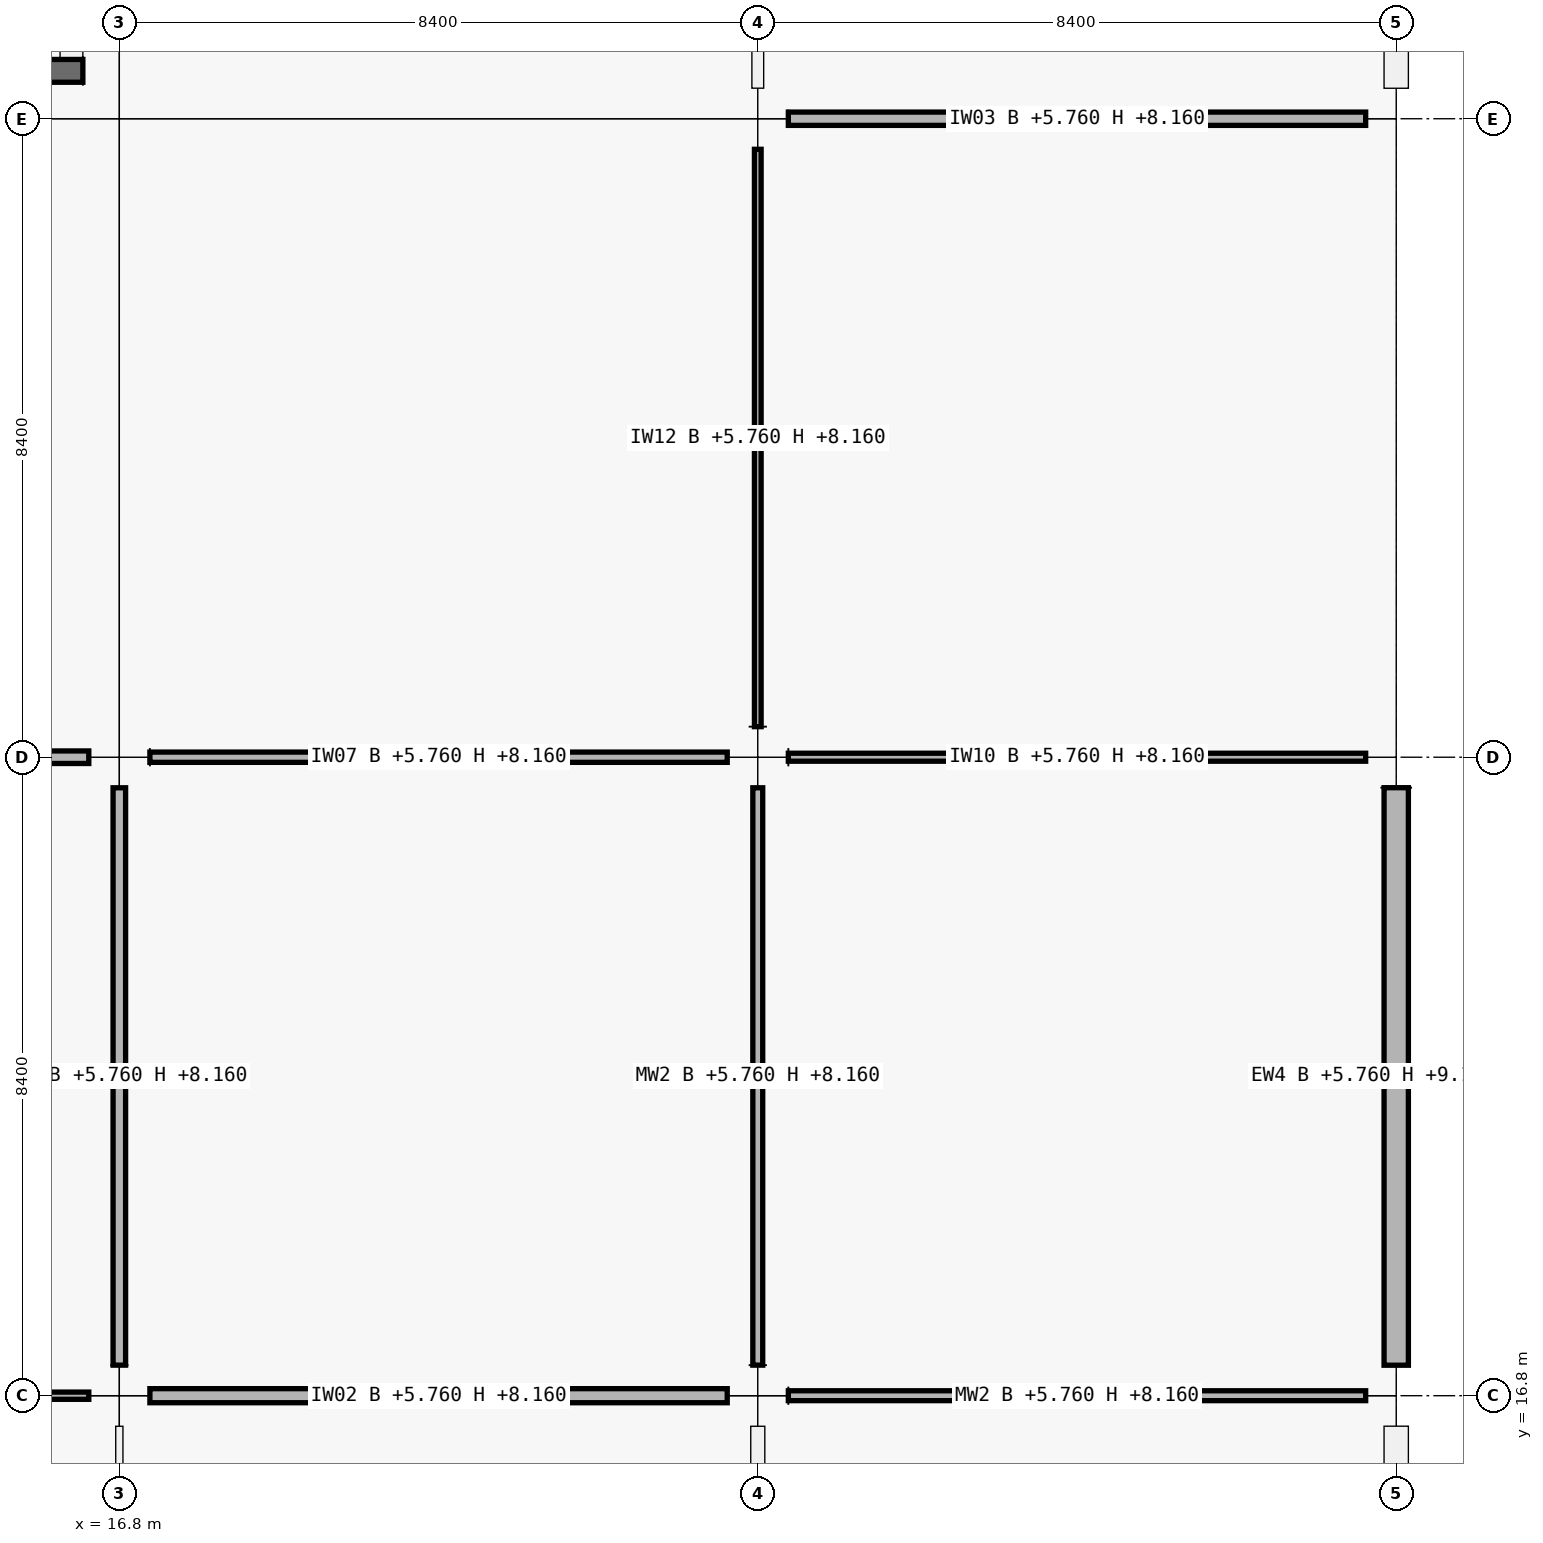
"""IFC4 building model, lengths in metres.
Left out: names, types, materials, properties, quantities, classifications, styles, units other than length and angle.
Written with IfcOpenShell. Run it as: python <this file> out.ifc"""

import sys

from ifc_helpers import new_model, si_unit, direction, frame, frame_2d, origin, origin_2d, place, context, subcontext, project, spatial, rectangle, extrude, element, fill, save


model = new_model("IFC4")
c1 = context("Model", 3, precision=1e-05, world=origin(), true_north=direction((0.0, 1.0)))
c2 = subcontext(c1, "Body", "Model", "MODEL_VIEW")
j1 = project(units=[si_unit("LENGTHUNIT", "METRE"), si_unit("PLANEANGLEUNIT", "RADIAN")], contexts=[c1])
p1 = place(None, origin())
s1 = spatial("IfcSite", under=j1, at=p1, CompositionType="ELEMENT")
p2 = place(p1, origin())
s2 = spatial("IfcBuilding", under=s1, at=p2, CompositionType="ELEMENT")
p3 = place(p2, frame((0.0, 0.0, 5.76)))
s3 = spatial("IfcBuildingStorey", under=s2, at=p3, CompositionType="ELEMENT", Elevation=5.76)
for number, where, z_axis, x_axis in (
    (1, (16.8, 16.8, 0.0), (0.0, 0.0, 1.0), (1.0, 0.0, 0.0)),
    (2, (16.8, 25.2, 0.0), (0.0, 0.0, 1.0), (1.0, 0.0, 0.0)),
    (3, (16.8, 33.6, 0.0), (0.0, 0.0, 1.0), (1.0, 0.0, 0.0)),
    (4, (25.2, 16.8, 0.0), (0.0, 0.0, 1.0), (1.0, 0.0, 0.0)),
    (5, (25.2, 25.2, 0.0), (0.0, 0.0, 1.0), (1.0, 0.0, 0.0)),
    (6, (25.2, 33.6, 0.0), (0.0, 0.0, 1.0), (1.0, 0.0, 0.0)),
    (7, (33.6, 16.8, 0.0), (0.0, 0.0, 1.0), (1.0, 0.0, 0.0)),
    (8, (33.6, 25.2, 0.0), (0.0, 0.0, 1.0), (1.0, 0.0, 0.0)),
    (9, (33.6, 33.6, 0.0), (0.0, 0.0, 1.0), (1.0, 0.0, 0.0)),
):
    element("IfcColumn", number, at=place(p3, frame(where, z_axis=z_axis, x_axis=x_axis)), inside=s3, PredefinedType="COLUMN", context=c2, shape_type="SweptSolid", body=[
        extrude(rectangle(XDim=0.8, YDim=0.8, at=origin_2d()), origin(), (0.0, 0.0, 1.0), 4.5),
    ])
p4 = place(p3, frame((33.6, 16.399, 0.0), z_axis=(0.0, 0.0, 1.0), x_axis=(0.0, -1.0, 0.0)))
e10 = element("IfcWall", 10, at=p4, inside=s3, PredefinedType="SOLIDWALL", context=c2, shape_type="SweptSolid", body=[
    extrude(rectangle(XDim=7.698, YDim=0.32, at=frame_2d((3.849, 0.0))), origin(), (0.0, 0.0, 1.0), 3.4),
])
p5 = place(p4, frame((2.699, 0.0, 0.9)))
e11 = element("IfcOpeningElement", 11, at=p5, cuts=e10, PredefinedType="OPENING", context=c2, shape_type="SweptSolid", body=[
    extrude(rectangle(XDim=2.3, YDim=1.85, at=frame_2d((1.15, 0.925))), frame((0.0, 0.16, 0.0), z_axis=(0.0, -1.0, 0.0), x_axis=(1.0, 0.0, 0.0)), (0.0, 0.0, 1.0), 0.32),
])
p6 = place(p3, frame((33.6, 24.799, 0.0), z_axis=(0.0, 0.0, 1.0), x_axis=(0.0, -1.0, 0.0)))
e12 = element("IfcWall", 12, at=p6, inside=s3, PredefinedType="SOLIDWALL", context=c2, shape_type="SweptSolid", body=[
    extrude(rectangle(XDim=7.598, YDim=0.32, at=frame_2d((3.799, 0.0))), origin(), (0.0, 0.0, 1.0), 3.4),
])
p7 = place(p6, frame((2.349, 0.0, 0.9)))
e13 = element("IfcOpeningElement", 13, at=p7, cuts=e12, PredefinedType="OPENING", context=c2, shape_type="SweptSolid", body=[
    extrude(rectangle(XDim=2.9, YDim=1.85, at=frame_2d((1.45, 0.925))), frame((0.0, 0.16, 0.0), z_axis=(0.0, -1.0, 0.0), x_axis=(1.0, 0.0, 0.0)), (0.0, 0.0, 1.0), 0.32),
])
p8 = place(p3, frame((33.6, 41.599, 0.0), z_axis=(0.0, 0.0, 1.0), x_axis=(0.0, -1.0, 0.0)))
e14 = element("IfcWall", 14, at=p8, inside=s3, PredefinedType="SOLIDWALL", context=c2, shape_type="SweptSolid", body=[
    extrude(rectangle(XDim=7.598, YDim=0.32, at=frame_2d((3.799, 0.0))), origin(), (0.0, 0.0, 1.0), 3.4),
])
p9 = place(p8, frame((3.074, 0.0, 0.9)))
e15 = element("IfcOpeningElement", 15, at=p9, cuts=e14, PredefinedType="OPENING", context=c2, shape_type="SweptSolid", body=[
    extrude(rectangle(XDim=1.45, YDim=1.85, at=frame_2d((0.725, 0.925))), frame((0.0, 0.16, 0.0), z_axis=(0.0, -1.0, 0.0), x_axis=(1.0, 0.0, 0.0)), (0.0, 0.0, 1.0), 0.32),
])
p10 = place(p3, frame((16.32, 34.23, 0.0), z_axis=(0.0, 0.0, 1.0), x_axis=(-1.0, 0.0, 0.0)))
e16 = element("IfcWall", 16, at=p10, inside=s3, PredefinedType="SHEAR", context=c2, shape_type="SweptSolid", body=[
    extrude(rectangle(XDim=7.44, YDim=0.3, at=frame_2d((3.72, 0.0))), origin(), (0.0, 0.0, 1.0), 4.5),
])
p11 = place(p10, frame((1.28, 0.0, 0.0)))
e17 = element("IfcOpeningElement", 17, at=p11, cuts=e16, PredefinedType="OPENING", context=c2, shape_type="SweptSolid", body=[
    extrude(rectangle(XDim=1.5, YDim=2.15, at=frame_2d((0.75, 1.075))), frame((0.0, 0.15, 0.0), z_axis=(0.0, -1.0, 0.0), x_axis=(1.0, 0.0, 0.0)), (0.0, 0.0, 1.0), 0.3),
])
p12 = place(p3, frame((16.17, 41.22, 0.0), z_axis=(0.0, 0.0, 1.0), x_axis=(0.0, -1.0, 0.0)))
e18 = element("IfcWall", 18, at=p12, inside=s3, PredefinedType="SHEAR", context=c2, shape_type="SweptSolid", body=[
    extrude(rectangle(XDim=6.84, YDim=0.3, at=frame_2d((3.42, 0.0))), origin(), (0.0, 0.0, 1.0), 4.5),
])
p13 = place(p3, frame((8.802, 16.8, 0.0), z_axis=(0.0, 0.0, 1.0), x_axis=(1.0, 0.0, 0.0)))
e19 = element("IfcWall", 19, at=p13, inside=s3, PredefinedType="PARTITIONING", context=c2, shape_type="SweptSolid", body=[
    extrude(rectangle(XDim=7.596, YDim=0.095, at=frame_2d((3.798, 0.0))), origin(), (0.0, 0.0, 1.0), 2.4),
])
p14 = place(p13, frame((3.258, 0.0, 0.0)))
e20 = element("IfcOpeningElement", 20, at=p14, cuts=e19, PredefinedType="OPENING", context=c2, shape_type="SweptSolid", body=[
    extrude(rectangle(XDim=1.08, YDim=2.22, at=frame_2d((0.54, 1.11))), frame((0.0, 0.047, 0.0), z_axis=(0.0, -1.0, 0.0), x_axis=(1.0, 0.0, 0.0)), (0.0, 0.0, 1.0), 0.095),
])
p15 = place(p3, frame((8.802, 25.2, 0.0), z_axis=(0.0, 0.0, 1.0), x_axis=(1.0, 0.0, 0.0)))
e21 = element("IfcWall", 21, at=p15, inside=s3, PredefinedType="PARTITIONING", context=c2, shape_type="SweptSolid", body=[
    extrude(rectangle(XDim=7.596, YDim=0.165, at=frame_2d((3.798, 0.0))), origin(), (0.0, 0.0, 1.0), 2.4),
])
p16 = place(p15, frame((3.318, 0.0, 0.0)))
e22 = element("IfcOpeningElement", 22, at=p16, cuts=e21, PredefinedType="OPENING", context=c2, shape_type="SweptSolid", body=[
    extrude(rectangle(XDim=0.96, YDim=2.18, at=frame_2d((0.48, 1.09))), frame((0.0, 0.083, 0.0), z_axis=(0.0, -1.0, 0.0), x_axis=(1.0, 0.0, 0.0)), (0.0, 0.0, 1.0), 0.165),
])
p17 = place(p3, frame((17.202, 16.8, 0.0), z_axis=(0.0, 0.0, 1.0), x_axis=(1.0, 0.0, 0.0)))
e23 = element("IfcWall", 23, at=p17, inside=s3, PredefinedType="PARTITIONING", context=c2, shape_type="SweptSolid", body=[
    extrude(rectangle(XDim=7.596, YDim=0.185, at=frame_2d((3.798, 0.0))), origin(), (0.0, 0.0, 1.0), 2.4),
])
p18 = place(p17, frame((3.268, 0.0, 0.0)))
e24 = element("IfcOpeningElement", 24, at=p18, cuts=e23, PredefinedType="OPENING", context=c2, shape_type="SweptSolid", body=[
    extrude(rectangle(XDim=1.06, YDim=2.22, at=frame_2d((0.53, 1.11))), frame((0.0, 0.093, 0.0), z_axis=(0.0, -1.0, 0.0), x_axis=(1.0, 0.0, 0.0)), (0.0, 0.0, 1.0), 0.185),
])
p19 = place(p3, frame((17.202, 25.2, 0.0), z_axis=(0.0, 0.0, 1.0), x_axis=(1.0, 0.0, 0.0)))
e25 = element("IfcWall", 25, at=p19, inside=s3, PredefinedType="PARTITIONING", context=c2, shape_type="SweptSolid", body=[
    extrude(rectangle(XDim=7.596, YDim=0.135, at=frame_2d((3.798, 0.0))), origin(), (0.0, 0.0, 1.0), 2.4),
])
p20 = place(p19, frame((3.338, 0.0, 0.0)))
e26 = element("IfcOpeningElement", 26, at=p20, cuts=e25, PredefinedType="OPENING", context=c2, shape_type="SweptSolid", body=[
    extrude(rectangle(XDim=0.92, YDim=2.15, at=frame_2d((0.46, 1.075))), frame((0.0, 0.067, 0.0), z_axis=(0.0, -1.0, 0.0), x_axis=(1.0, 0.0, 0.0)), (0.0, 0.0, 1.0), 0.135),
])
p21 = place(p3, frame((25.602, 16.8, 0.0), z_axis=(0.0, 0.0, 1.0), x_axis=(1.0, 0.0, 0.0)))
e27 = element("IfcWall", 27, at=p21, inside=s3, PredefinedType="MOVABLE", context=c2, shape_type="SweptSolid", body=[
    extrude(rectangle(XDim=7.596, YDim=0.13, at=frame_2d((3.798, 0.0))), origin(), (0.0, 0.0, 1.0), 2.4),
])
p22 = place(p21, frame((3.313, 0.0, 0.0)))
e28 = element("IfcOpeningElement", 28, at=p22, cuts=e27, PredefinedType="OPENING", context=c2, shape_type="SweptSolid", body=[
    extrude(rectangle(XDim=0.97, YDim=2.12, at=frame_2d((0.485, 1.06))), frame((0.0, 0.065, 0.0), z_axis=(0.0, -1.0, 0.0), x_axis=(1.0, 0.0, 0.0)), (0.0, 0.0, 1.0), 0.13),
])
p23 = place(p3, frame((25.602, 25.2, 0.0), z_axis=(0.0, 0.0, 1.0), x_axis=(1.0, 0.0, 0.0)))
e29 = element("IfcWall", 29, at=p23, inside=s3, PredefinedType="PARTITIONING", context=c2, shape_type="SweptSolid", body=[
    extrude(rectangle(XDim=7.596, YDim=0.105, at=frame_2d((3.798, 0.0))), origin(), (0.0, 0.0, 1.0), 2.4),
])
p24 = place(p23, frame((3.278, 0.0, 0.0)))
e30 = element("IfcOpeningElement", 30, at=p24, cuts=e29, PredefinedType="OPENING", context=c2, shape_type="SweptSolid", body=[
    extrude(rectangle(XDim=1.04, YDim=2.2, at=frame_2d((0.52, 1.1))), frame((0.0, 0.052, 0.0), z_axis=(0.0, -1.0, 0.0), x_axis=(1.0, 0.0, 0.0)), (0.0, 0.0, 1.0), 0.105),
])
p25 = place(p3, frame((25.602, 33.6, 0.0), z_axis=(0.0, 0.0, 1.0), x_axis=(1.0, 0.0, 0.0)))
e31 = element("IfcWall", 31, at=p25, inside=s3, PredefinedType="PARTITIONING", context=c2, shape_type="SweptSolid", body=[
    extrude(rectangle(XDim=7.596, YDim=0.175, at=frame_2d((3.798, 0.0))), origin(), (0.0, 0.0, 1.0), 2.4),
])
p26 = place(p25, frame((3.333, 0.0, 0.0)))
e32 = element("IfcOpeningElement", 32, at=p26, cuts=e31, PredefinedType="OPENING", context=c2, shape_type="SweptSolid", body=[
    extrude(rectangle(XDim=0.93, YDim=2.12, at=frame_2d((0.465, 1.06))), frame((0.0, 0.087, 0.0), z_axis=(0.0, -1.0, 0.0), x_axis=(1.0, 0.0, 0.0)), (0.0, 0.0, 1.0), 0.175),
])
p27 = place(p3, frame((16.8, 8.702, 0.0), z_axis=(0.0, 0.0, 1.0), x_axis=(0.0, 1.0, 0.0)))
e33 = element("IfcWall", 33, at=p27, inside=s3, PredefinedType="PARTITIONING", context=c2, shape_type="SweptSolid", body=[
    extrude(rectangle(XDim=7.696, YDim=0.095, at=frame_2d((3.848, 0.0))), origin(), (0.0, 0.0, 1.0), 2.4),
])
p28 = place(p27, frame((3.323, 0.0, 0.0)))
e34 = element("IfcOpeningElement", 34, at=p28, cuts=e33, PredefinedType="OPENING", context=c2, shape_type="SweptSolid", body=[
    extrude(rectangle(XDim=1.05, YDim=2.12, at=frame_2d((0.525, 1.06))), frame((0.0, 0.047, 0.0), z_axis=(0.0, -1.0, 0.0), x_axis=(1.0, 0.0, 0.0)), (0.0, 0.0, 1.0), 0.095),
])
p29 = place(p3, frame((16.8, 17.202, 0.0), z_axis=(0.0, 0.0, 1.0), x_axis=(0.0, 1.0, 0.0)))
e35 = element("IfcWall", 35, at=p29, inside=s3, PredefinedType="PARTITIONING", context=c2, shape_type="SweptSolid", body=[
    extrude(rectangle(XDim=7.596, YDim=0.165, at=frame_2d((3.798, 0.0))), origin(), (0.0, 0.0, 1.0), 2.4),
])
p30 = place(p29, frame((3.293, 0.0, 0.0)))
e36 = element("IfcOpeningElement", 36, at=p30, cuts=e35, PredefinedType="OPENING", context=c2, shape_type="SweptSolid", body=[
    extrude(rectangle(XDim=1.01, YDim=2.12, at=frame_2d((0.505, 1.06))), frame((0.0, 0.083, 0.0), z_axis=(0.0, -1.0, 0.0), x_axis=(1.0, 0.0, 0.0)), (0.0, 0.0, 1.0), 0.165),
])
p31 = place(p3, frame((25.2, 8.727, 0.0), z_axis=(0.0, 0.0, 1.0), x_axis=(0.0, 1.0, 0.0)))
e37 = element("IfcWall", 37, at=p31, inside=s3, PredefinedType="PARTITIONING", context=c2, shape_type="SweptSolid", body=[
    extrude(rectangle(XDim=7.671, YDim=0.185, at=frame_2d((3.835, 0.0))), origin(), (0.0, 0.0, 1.0), 2.4),
])
p32 = place(p31, frame((3.306, 0.0, 0.0)))
e38 = element("IfcOpeningElement", 38, at=p32, cuts=e37, PredefinedType="OPENING", context=c2, shape_type="SweptSolid", body=[
    extrude(rectangle(XDim=1.06, YDim=2.22, at=frame_2d((0.53, 1.11))), frame((0.0, 0.093, 0.0), z_axis=(0.0, -1.0, 0.0), x_axis=(1.0, 0.0, 0.0)), (0.0, 0.0, 1.0), 0.185),
])
p33 = place(p3, frame((25.2, 17.202, 0.0), z_axis=(0.0, 0.0, 1.0), x_axis=(0.0, 1.0, 0.0)))
e39 = element("IfcWall", 39, at=p33, inside=s3, PredefinedType="MOVABLE", context=c2, shape_type="SweptSolid", body=[
    extrude(rectangle(XDim=7.596, YDim=0.13, at=frame_2d((3.798, 0.0))), origin(), (0.0, 0.0, 1.0), 2.4),
])
p34 = place(p33, frame((3.278, 0.0, 0.0)))
e40 = element("IfcOpeningElement", 40, at=p34, cuts=e39, PredefinedType="OPENING", context=c2, shape_type="SweptSolid", body=[
    extrude(rectangle(XDim=1.04, YDim=2.2, at=frame_2d((0.52, 1.1))), frame((0.0, 0.065, 0.0), z_axis=(0.0, -1.0, 0.0), x_axis=(1.0, 0.0, 0.0)), (0.0, 0.0, 1.0), 0.13),
])
p35 = place(p3, frame((25.2, 25.602, 0.0), z_axis=(0.0, 0.0, 1.0), x_axis=(0.0, 1.0, 0.0)))
e41 = element("IfcWall", 41, at=p35, inside=s3, PredefinedType="PARTITIONING", context=c2, shape_type="SweptSolid", body=[
    extrude(rectangle(XDim=7.596, YDim=0.088, at=frame_2d((3.798, 0.0))), origin(), (0.0, 0.0, 1.0), 2.4),
])
p36 = place(p35, frame((3.268, 0.0, 0.0)))
e42 = element("IfcOpeningElement", 42, at=p36, cuts=e41, PredefinedType="OPENING", context=c2, shape_type="SweptSolid", body=[
    extrude(rectangle(XDim=1.06, YDim=2.22, at=frame_2d((0.53, 1.11))), frame((0.0, 0.044, 0.0), z_axis=(0.0, -1.0, 0.0), x_axis=(1.0, 0.0, 0.0)), (0.0, 0.0, 1.0), 0.088),
])
p37 = place(p3, frame((25.2, 34.002, 0.0), z_axis=(0.0, 0.0, 1.0), x_axis=(0.0, 1.0, 0.0)))
e43 = element("IfcWall", 43, at=p37, inside=s3, PredefinedType="PARTITIONING", context=c2, shape_type="SweptSolid", body=[
    extrude(rectangle(XDim=7.596, YDim=0.155, at=frame_2d((3.798, 0.0))), origin(), (0.0, 0.0, 1.0), 2.4),
])
p38 = place(p37, frame((3.278, 0.0, 0.0)))
e44 = element("IfcOpeningElement", 44, at=p38, cuts=e43, PredefinedType="OPENING", context=c2, shape_type="SweptSolid", body=[
    extrude(rectangle(XDim=1.04, YDim=2.2, at=frame_2d((0.52, 1.1))), frame((0.0, 0.078, 0.0), z_axis=(0.0, -1.0, 0.0), x_axis=(1.0, 0.0, 0.0)), (0.0, 0.0, 1.0), 0.155),
])
p39 = place(p7, origin())
e45 = element("IfcWindow", 45, at=p39, inside=s3, PartitioningType="SINGLE_PANEL", PredefinedType="WINDOW", context=c2, shape_type="SweptSolid", body=[
    extrude(rectangle(XDim=2.9, YDim=1.85, at=frame_2d((1.45, 0.925))), frame((0.0, 0.03, 0.0), z_axis=(0.0, -1.0, 0.0), x_axis=(1.0, 0.0, 0.0)), (0.0, 0.0, 1.0), 0.06),
])
fill(e13, e45)
p40 = place(p20, origin())
e46 = element("IfcDoor", 46, at=p40, inside=s3, OperationType="SINGLE_SWING_RIGHT", PredefinedType="DOOR", context=c2, shape_type="SweptSolid", body=[
    extrude(rectangle(XDim=0.92, YDim=2.15, at=frame_2d((0.46, 1.075))), frame((0.0, 0.025, 0.0), z_axis=(0.0, -1.0, 0.0), x_axis=(1.0, 0.0, 0.0)), (0.0, 0.0, 1.0), 0.05),
])
fill(e26, e46)
p41 = place(p36, origin())
e47 = element("IfcDoor", 47, at=p41, inside=s3, OperationType="SINGLE_SWING_LEFT", PredefinedType="DOOR", context=c2, shape_type="SweptSolid", body=[
    extrude(rectangle(XDim=1.06, YDim=2.22, at=frame_2d((0.53, 1.11))), frame((0.0, 0.025, 0.0), z_axis=(0.0, -1.0, 0.0), x_axis=(1.0, 0.0, 0.0)), (0.0, 0.0, 1.0), 0.05),
])
fill(e42, e47)
p42 = place(p22, origin())
e48 = element("IfcDoor", 48, at=p42, inside=s3, OperationType="SINGLE_SWING_RIGHT", PredefinedType="DOOR", context=c2, shape_type="SweptSolid", body=[
    extrude(rectangle(XDim=0.97, YDim=2.12, at=frame_2d((0.485, 1.06))), frame((0.0, 0.025, 0.0), z_axis=(0.0, -1.0, 0.0), x_axis=(1.0, 0.0, 0.0)), (0.0, 0.0, 1.0), 0.05),
])
fill(e28, e48)
p43 = place(p18, origin())
e49 = element("IfcDoor", 49, at=p43, inside=s3, OperationType="SINGLE_SWING_LEFT", PredefinedType="DOOR", context=c2, shape_type="SweptSolid", body=[
    extrude(rectangle(XDim=1.06, YDim=2.22, at=frame_2d((0.53, 1.11))), frame((0.0, 0.025, 0.0), z_axis=(0.0, -1.0, 0.0), x_axis=(1.0, 0.0, 0.0)), (0.0, 0.0, 1.0), 0.05),
])
fill(e24, e49)
p44 = place(p24, origin())
e50 = element("IfcDoor", 50, at=p44, inside=s3, OperationType="SINGLE_SWING_RIGHT", PredefinedType="DOOR", context=c2, shape_type="SweptSolid", body=[
    extrude(rectangle(XDim=1.04, YDim=2.2, at=frame_2d((0.52, 1.1))), frame((0.0, 0.025, 0.0), z_axis=(0.0, -1.0, 0.0), x_axis=(1.0, 0.0, 0.0)), (0.0, 0.0, 1.0), 0.05),
])
fill(e30, e50)
p45 = place(p26, origin())
e51 = element("IfcDoor", 51, at=p45, inside=s3, OperationType="SINGLE_SWING_RIGHT", PredefinedType="DOOR", context=c2, shape_type="SweptSolid", body=[
    extrude(rectangle(XDim=0.93, YDim=2.12, at=frame_2d((0.465, 1.06))), frame((0.0, 0.025, 0.0), z_axis=(0.0, -1.0, 0.0), x_axis=(1.0, 0.0, 0.0)), (0.0, 0.0, 1.0), 0.05),
])
fill(e32, e51)
p46 = place(p30, origin())
e52 = element("IfcDoor", 52, at=p46, inside=s3, OperationType="SINGLE_SWING_LEFT", PredefinedType="DOOR", context=c2, shape_type="SweptSolid", body=[
    extrude(rectangle(XDim=1.01, YDim=2.12, at=frame_2d((0.505, 1.06))), frame((0.0, 0.025, 0.0), z_axis=(0.0, -1.0, 0.0), x_axis=(1.0, 0.0, 0.0)), (0.0, 0.0, 1.0), 0.05),
])
fill(e36, e52)
p47 = place(p34, origin())
e53 = element("IfcDoor", 53, at=p47, inside=s3, OperationType="SINGLE_SWING_RIGHT", PredefinedType="DOOR", context=c2, shape_type="SweptSolid", body=[
    extrude(rectangle(XDim=1.04, YDim=2.2, at=frame_2d((0.52, 1.1))), frame((0.0, 0.025, 0.0), z_axis=(0.0, -1.0, 0.0), x_axis=(1.0, 0.0, 0.0)), (0.0, 0.0, 1.0), 0.05),
])
fill(e40, e53)
save(model, sys.argv[1])
